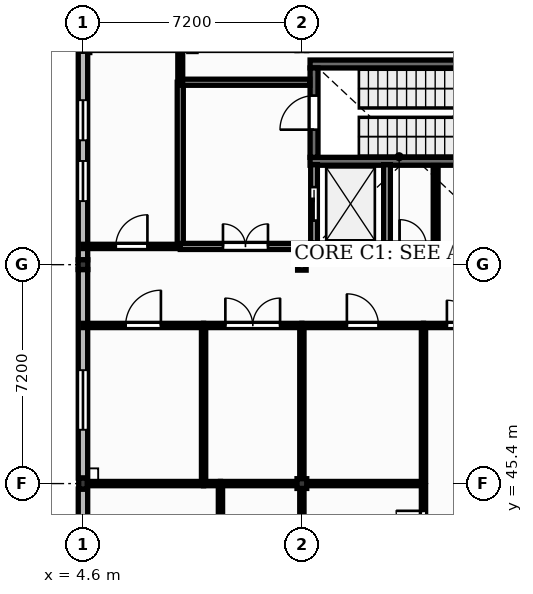
"""IFC4 building model, lengths in metres.
Left out: names, types, materials, properties, quantities, classifications, styles, units other than length and angle.
Written with IfcOpenShell. Run it as: python <this file> out.ifc"""

import sys

from ifc_helpers import new_model, si_unit, direction, frame, frame_2d, origin, origin_2d, place, context, subcontext, project, spatial, rectangle, extrude, element, fill, save


model = new_model("IFC4")
c1 = context("Model", 3, precision=1e-05, world=origin(), true_north=direction((0.0, 1.0)))
c2 = subcontext(c1, "Body", "Model", "MODEL_VIEW")
j1 = project(units=[si_unit("LENGTHUNIT", "METRE"), si_unit("PLANEANGLEUNIT", "RADIAN")], contexts=[c1])
p1 = place(None, origin())
s1 = spatial("IfcSite", under=j1, at=p1, CompositionType="ELEMENT")
p2 = place(p1, origin())
s2 = spatial("IfcBuilding", under=s1, at=p2, CompositionType="ELEMENT")
p3 = place(p2, frame((0.0, 0.0, 9.0)))
s3 = spatial("IfcBuildingStorey", under=s2, at=p3, CompositionType="ELEMENT", Elevation=9.0)
p4 = place(p3, frame((4.6, 45.4, 0.0), z_axis=(0.0, 0.0, 1.0), x_axis=(1.0, 0.0, 0.0)))
e1 = element("IfcColumn", 1, at=p4, inside=s3, PredefinedType="COLUMN", context=c2, shape_type="SweptSolid", body=[
    extrude(rectangle(XDim=0.28, YDim=0.36, at=origin_2d()), origin(), (0.0, 0.0, 1.0), 3.99),
])
for number, where, z_axis, x_axis in (
    (2, (4.6, 52.6, 0.0), (0.0, 0.0, 1.0), (1.0, 0.0, 0.0)),
    (3, (11.8, 45.4, 0.0), (0.0, 0.0, 1.0), (1.0, 0.0, 0.0)),
):
    element("IfcColumn", number, at=place(p3, frame(where, z_axis=z_axis, x_axis=x_axis)), inside=s3, PredefinedType="COLUMN", context=c2, shape_type="SweptSolid", body=[
        extrude(rectangle(XDim=0.32, YDim=0.32, at=origin_2d()), origin(), (0.0, 0.0, 1.0), 3.99),
    ])
p5 = place(p3, frame((11.8, 52.6, 0.0), z_axis=(0.0, 0.0, 1.0), x_axis=(1.0, 0.0, 0.0)))
e4 = element("IfcColumn", 4, at=p5, inside=s3, PredefinedType="COLUMN", context=c2, shape_type="SweptSolid", body=[
    extrude(rectangle(XDim=0.28, YDim=0.36, at=origin_2d()), origin(), (0.0, 0.0, 1.0), 3.99),
])
p6 = place(p3, frame((4.6, 36.96, 0.0), z_axis=(0.0, 0.0, 1.0), x_axis=(0.0, 1.0, 0.0)))
e5 = element("IfcWall", 5, at=p6, inside=s3, PredefinedType="SOLIDWALL", context=c2, shape_type="SweptSolid", body=[
    extrude(rectangle(XDim=8.26, YDim=0.31, at=frame_2d((4.13, 0.0))), origin(), (0.0, 0.0, 1.0), 3.53),
])
p7 = place(p6, frame((2.795, 0.0, 1.05)))
e6 = element("IfcOpeningElement", 6, at=p7, cuts=e5, PredefinedType="OPENING", context=c2, shape_type="SweptSolid", body=[
    extrude(rectangle(XDim=1.68, YDim=1.65, at=frame_2d((0.84, 0.825))), frame((0.0, 0.165, 0.0), z_axis=(0.0, -1.0, 0.0), x_axis=(1.0, 0.0, 0.0)), (0.0, 0.0, 1.0), 0.33),
])
p8 = place(p6, frame((5.155, 0.0, 1.05)))
e7 = element("IfcOpeningElement", 7, at=p8, cuts=e5, PredefinedType="OPENING", context=c2, shape_type="SweptSolid", body=[
    extrude(rectangle(XDim=1.68, YDim=1.65, at=frame_2d((0.84, 0.825))), frame((0.0, 0.165, 0.0), z_axis=(0.0, -1.0, 0.0), x_axis=(1.0, 0.0, 0.0)), (0.0, 0.0, 1.0), 0.33),
])
p9 = place(p3, frame((4.6, 45.58, 0.0), z_axis=(0.0, 0.0, 1.0), x_axis=(0.0, 1.0, 0.0)))
e8 = element("IfcWall", 8, at=p9, inside=s3, PredefinedType="SOLIDWALL", context=c2, shape_type="SweptSolid", body=[
    extrude(rectangle(XDim=6.86, YDim=0.31, at=frame_2d((3.43, 0.0))), origin(), (0.0, 0.0, 1.0), 3.53),
])
p10 = place(p9, frame((1.59, 0.0, 1.05)))
e9 = element("IfcOpeningElement", 9, at=p10, cuts=e8, PredefinedType="OPENING", context=c2, shape_type="SweptSolid", body=[
    extrude(rectangle(XDim=1.96, YDim=1.65, at=frame_2d((0.98, 0.825))), frame((0.0, 0.165, 0.0), z_axis=(0.0, -1.0, 0.0), x_axis=(1.0, 0.0, 0.0)), (0.0, 0.0, 1.0), 0.33),
])
p11 = place(p3, frame((4.6, 52.76, 0.0), z_axis=(0.0, 0.0, 1.0), x_axis=(0.0, 1.0, 0.0)))
e10 = element("IfcWall", 10, at=p11, inside=s3, PredefinedType="SOLIDWALL", context=c2, shape_type="SweptSolid", body=[
    extrude(rectangle(XDim=6.86, YDim=0.31, at=frame_2d((3.43, 0.0))), origin(), (0.0, 0.0, 1.0), 3.53),
])
p12 = place(p11, frame((1.93, 0.0, 1.5)))
e11 = element("IfcOpeningElement", 11, at=p12, cuts=e10, PredefinedType="OPENING", context=c2, shape_type="SweptSolid", body=[
    extrude(rectangle(XDim=1.32, YDim=1.25, at=frame_2d((0.66, 0.625))), frame((0.0, 0.165, 0.0), z_axis=(0.0, -1.0, 0.0), x_axis=(1.0, 0.0, 0.0)), (0.0, 0.0, 1.0), 0.33),
])
p13 = place(p11, frame((3.93, 0.0, 1.5)))
e12 = element("IfcOpeningElement", 12, at=p13, cuts=e10, PredefinedType="OPENING", context=c2, shape_type="SweptSolid", body=[
    extrude(rectangle(XDim=1.32, YDim=1.25, at=frame_2d((0.66, 0.625))), frame((0.0, 0.165, 0.0), z_axis=(0.0, -1.0, 0.0), x_axis=(1.0, 0.0, 0.0)), (0.0, 0.0, 1.0), 0.33),
])
for number, where, z_axis, x_axis in (
    (13, (12.07, 56.0, 0.0), (0.0, 0.0, 1.0), (1.0, 0.0, 0.0)),
    (14, (12.07, 59.2, 0.0), (0.0, 0.0, 1.0), (1.0, 0.0, 0.0)),
):
    element("IfcWall", number, at=place(p3, frame(where, z_axis=z_axis, x_axis=x_axis)), inside=s3, PredefinedType="SHEAR", context=c2, shape_type="SweptSolid", body=[
        extrude(rectangle(XDim=6.66, YDim=0.26, at=frame_2d((3.33, 0.0))), origin(), (0.0, 0.0, 1.0), 3.95),
    ])
p14 = place(p3, frame((12.2, 56.13, 0.0), z_axis=(0.0, 0.0, 1.0), x_axis=(0.0, 1.0, 0.0)))
e15 = element("IfcWall", 15, at=p14, inside=s3, PredefinedType="SHEAR", context=c2, shape_type="SweptSolid", body=[
    extrude(rectangle(XDim=2.94, YDim=0.26, at=frame_2d((1.47, 0.0))), origin(), (0.0, 0.0, 1.0), 3.95),
])
p15 = place(p14, frame((0.91, 0.0, 0.0)))
e16 = element("IfcOpeningElement", 16, at=p15, cuts=e15, PredefinedType="OPENING", context=c2, shape_type="SweptSolid", body=[
    extrude(rectangle(XDim=1.12, YDim=2.1, at=frame_2d((0.56, 1.05))), frame((0.0, 0.14, 0.0), z_axis=(0.0, -1.0, 0.0), x_axis=(1.0, 0.0, 0.0)), (0.0, 0.0, 1.0), 0.28),
])
p16 = place(p3, frame((12.2, 53.2, 0.0), z_axis=(0.0, 0.0, 1.0), x_axis=(1.0, 0.0, 0.0)))
e17 = element("IfcWall", 17, at=p16, inside=s3, PredefinedType="SOLIDWALL", context=c2, shape_type="SweptSolid", body=[
    extrude(rectangle(XDim=2.4, YDim=0.22, at=frame_2d((1.2, 0.0))), origin(), (0.0, 0.0, 1.0), 3.95),
])
p17 = place(p3, frame((12.2, 53.31, 0.0), z_axis=(0.0, 0.0, 1.0), x_axis=(0.0, 1.0, 0.0)))
e18 = element("IfcWall", 18, at=p17, inside=s3, PredefinedType="SOLIDWALL", context=c2, shape_type="SweptSolid", body=[
    extrude(rectangle(XDim=2.58, YDim=0.22, at=frame_2d((1.29, 0.0))), origin(), (0.0, 0.0, 1.0), 3.95),
])
p18 = place(p17, frame((0.74, 0.0, 0.0)))
e19 = element("IfcOpeningElement", 19, at=p18, cuts=e18, PredefinedType="OPENING", context=c2, shape_type="SweptSolid", body=[
    extrude(rectangle(XDim=1.1, YDim=2.15, at=frame_2d((0.55, 1.075))), frame((0.0, 0.12, 0.0), z_axis=(0.0, -1.0, 0.0), x_axis=(1.0, 0.0, 0.0)), (0.0, 0.0, 1.0), 0.24),
])
p19 = place(p3, frame((14.6, 53.31, 0.0), z_axis=(0.0, 0.0, 1.0), x_axis=(0.0, 1.0, 0.0)))
e20 = element("IfcWall", 20, at=p19, inside=s3, PredefinedType="SOLIDWALL", context=c2, shape_type="SweptSolid", body=[
    extrude(rectangle(XDim=2.58, YDim=0.22, at=frame_2d((1.29, 0.0))), origin(), (0.0, 0.0, 1.0), 3.95),
])
p20 = place(p3, frame((4.74, 45.4, 0.0), z_axis=(0.0, 0.0, 1.0), x_axis=(1.0, 0.0, 0.0)))
e21 = element("IfcWall", 21, at=p20, inside=s3, PredefinedType="PARTITIONING", context=c2, shape_type="SweptSolid", body=[
    extrude(rectangle(XDim=3.827, YDim=0.14, at=frame_2d((1.914, 0.0))), origin(), (0.0, 0.0, 1.0), 3.39),
])
p21 = place(p3, frame((4.6, 50.6, 0.0), z_axis=(0.0, 0.0, 1.0), x_axis=(1.0, 0.0, 0.0)))
e22 = element("IfcWall", 22, at=p21, inside=s3, PredefinedType="PARTITIONING", context=c2, shape_type="SweptSolid", body=[
    extrude(rectangle(XDim=3.967, YDim=0.14, at=frame_2d((1.983, 0.0))), origin(), (0.0, 0.0, 1.0), 3.96),
])
p22 = place(p21, frame((1.404, 0.0, 0.0)))
e23 = element("IfcOpeningElement", 23, at=p22, cuts=e22, PredefinedType="OPENING", context=c2, shape_type="SweptSolid", body=[
    extrude(rectangle(XDim=1.16, YDim=2.1, at=frame_2d((0.58, 1.05))), frame((0.0, 0.08, 0.0), z_axis=(0.0, -1.0, 0.0), x_axis=(1.0, 0.0, 0.0)), (0.0, 0.0, 1.0), 0.16),
])
p23 = place(p3, frame((4.6, 53.2, 0.0), z_axis=(0.0, 0.0, 1.0), x_axis=(1.0, 0.0, 0.0)))
e24 = element("IfcWall", 24, at=p23, inside=s3, PredefinedType="PARTITIONING", context=c2, shape_type="SweptSolid", body=[
    extrude(rectangle(XDim=3.2, YDim=0.14, at=frame_2d((1.6, 0.0))), origin(), (0.0, 0.0, 1.0), 3.96),
])
p24 = place(p23, frame((1.08, 0.0, 0.0)))
e25 = element("IfcOpeningElement", 25, at=p24, cuts=e24, PredefinedType="OPENING", context=c2, shape_type="SweptSolid", body=[
    extrude(rectangle(XDim=1.04, YDim=2.1, at=frame_2d((0.52, 1.05))), frame((0.0, 0.08, 0.0), z_axis=(0.0, -1.0, 0.0), x_axis=(1.0, 0.0, 0.0)), (0.0, 0.0, 1.0), 0.16),
])
p25 = place(p3, frame((7.8, 53.27, 0.0), z_axis=(0.0, 0.0, 1.0), x_axis=(0.0, 1.0, 0.0)))
e26 = element("IfcWall", 26, at=p25, inside=s3, PredefinedType="PARTITIONING", context=c2, shape_type="SweptSolid", body=[
    extrude(rectangle(XDim=5.33, YDim=0.2, at=frame_2d((2.665, 0.0))), origin(), (0.0, 0.0, 1.0), 3.96),
])
p26 = place(p3, frame((7.8, 53.2, 0.0), z_axis=(0.0, 0.0, 1.0), x_axis=(1.0, 0.0, 0.0)))
e27 = element("IfcWall", 27, at=p26, inside=s3, PredefinedType="PARTITIONING", context=c2, shape_type="SweptSolid", body=[
    extrude(rectangle(XDim=4.29, YDim=0.2, at=frame_2d((2.145, 0.0))), origin(), (0.0, 0.0, 1.0), 3.96),
])
p27 = place(p26, frame((1.405, 0.0, 0.0)))
e28 = element("IfcOpeningElement", 28, at=p27, cuts=e27, PredefinedType="OPENING", context=c2, shape_type="SweptSolid", body=[
    extrude(rectangle(XDim=1.48, YDim=2.25, at=frame_2d((0.74, 1.125))), frame((0.0, 0.11, 0.0), z_axis=(0.0, -1.0, 0.0), x_axis=(1.0, 0.0, 0.0)), (0.0, 0.0, 1.0), 0.22),
])
p28 = place(p3, frame((8.567, 45.47, 0.0), z_axis=(0.0, 0.0, 1.0), x_axis=(0.0, 1.0, 0.0)))
e29 = element("IfcWall", 29, at=p28, inside=s3, PredefinedType="PARTITIONING", context=c2, shape_type="SweptSolid", body=[
    extrude(rectangle(XDim=5.06, YDim=0.14, at=frame_2d((2.53, 0.0))), origin(), (0.0, 0.0, 1.0), 3.96),
])
p29 = place(p3, frame((8.567, 45.4, 0.0), z_axis=(0.0, 0.0, 1.0), x_axis=(1.0, 0.0, 0.0)))
e30 = element("IfcWall", 30, at=p29, inside=s3, PredefinedType="PARTITIONING", context=c2, shape_type="SweptSolid", body=[
    extrude(rectangle(XDim=0.555, YDim=0.14, at=frame_2d((0.278, 0.0))), origin(), (0.0, 0.0, 1.0), 3.39),
])
p30 = place(p3, frame((8.567, 50.6, 0.0), z_axis=(0.0, 0.0, 1.0), x_axis=(1.0, 0.0, 0.0)))
e31 = element("IfcWall", 31, at=p30, inside=s3, PredefinedType="PARTITIONING", context=c2, shape_type="SweptSolid", body=[
    extrude(rectangle(XDim=3.233, YDim=0.14, at=frame_2d((1.617, 0.0))), origin(), (0.0, 0.0, 1.0), 3.96),
])
p31 = place(p30, frame((0.717, 0.0, 0.0)))
e32 = element("IfcOpeningElement", 32, at=p31, cuts=e31, PredefinedType="OPENING", context=c2, shape_type="SweptSolid", body=[
    extrude(rectangle(XDim=1.8, YDim=2.3, at=frame_2d((0.9, 1.15))), frame((0.0, 0.08, 0.0), z_axis=(0.0, -1.0, 0.0), x_axis=(1.0, 0.0, 0.0)), (0.0, 0.0, 1.0), 0.16),
])
p32 = place(p3, frame((9.122, 38.52, 0.0), z_axis=(0.0, 0.0, 1.0), x_axis=(0.0, 1.0, 0.0)))
e33 = element("IfcWall", 33, at=p32, inside=s3, PredefinedType="PARTITIONING", context=c2, shape_type="SweptSolid", body=[
    extrude(rectangle(XDim=6.81, YDim=0.14, at=frame_2d((3.405, 0.0))), origin(), (0.0, 0.0, 1.0), 3.96),
])
p33 = place(p3, frame((9.122, 45.4, 0.0), z_axis=(0.0, 0.0, 1.0), x_axis=(1.0, 0.0, 0.0)))
e34 = element("IfcWall", 34, at=p33, inside=s3, PredefinedType="PARTITIONING", context=c2, shape_type="SweptSolid", body=[
    extrude(rectangle(XDim=2.518, YDim=0.14, at=frame_2d((1.259, 0.0))), origin(), (0.0, 0.0, 1.0), 3.39),
])
p34 = place(p3, frame((11.8, 41.877, 0.0), z_axis=(0.0, 0.0, 1.0), x_axis=(0.0, 1.0, 0.0)))
e35 = element("IfcWall", 35, at=p34, inside=s3, PredefinedType="PARTITIONING", context=c2, shape_type="SweptSolid", body=[
    extrude(rectangle(XDim=3.363, YDim=0.14, at=frame_2d((1.682, 0.0))), origin(), (0.0, 0.0, 1.0), 3.35),
])
p35 = place(p3, frame((11.8, 45.56, 0.0), z_axis=(0.0, 0.0, 1.0), x_axis=(0.0, 1.0, 0.0)))
e36 = element("IfcWall", 36, at=p35, inside=s3, PredefinedType="PARTITIONING", context=c2, shape_type="SweptSolid", body=[
    extrude(rectangle(XDim=4.97, YDim=0.14, at=frame_2d((2.485, 0.0))), origin(), (0.0, 0.0, 1.0), 3.47),
])
p36 = place(p3, frame((11.96, 45.4, 0.0), z_axis=(0.0, 0.0, 1.0), x_axis=(1.0, 0.0, 0.0)))
e37 = element("IfcWall", 37, at=p36, inside=s3, PredefinedType="PARTITIONING", context=c2, shape_type="SweptSolid", body=[
    extrude(rectangle(XDim=3.84, YDim=0.14, at=frame_2d((1.92, 0.0))), origin(), (0.0, 0.0, 1.0), 3.31),
])
p37 = place(p3, frame((11.8, 50.6, 0.0), z_axis=(0.0, 0.0, 1.0), x_axis=(1.0, 0.0, 0.0)))
e38 = element("IfcWall", 38, at=p37, inside=s3, PredefinedType="PARTITIONING", context=c2, shape_type="SweptSolid", body=[
    extrude(rectangle(XDim=4.0, YDim=0.14, at=frame_2d((2.0, 0.0))), origin(), (0.0, 0.0, 1.0), 3.96),
])
p38 = place(p37, frame((1.48, 0.0, 0.0)))
e39 = element("IfcOpeningElement", 39, at=p38, cuts=e38, PredefinedType="OPENING", context=c2, shape_type="SweptSolid", body=[
    extrude(rectangle(XDim=1.04, YDim=2.1, at=frame_2d((0.52, 1.05))), frame((0.0, 0.08, 0.0), z_axis=(0.0, -1.0, 0.0), x_axis=(1.0, 0.0, 0.0)), (0.0, 0.0, 1.0), 0.16),
])
p39 = place(p3, frame((14.71, 53.2, 0.0), z_axis=(0.0, 0.0, 1.0), x_axis=(1.0, 0.0, 0.0)))
e40 = element("IfcWall", 40, at=p39, inside=s3, PredefinedType="SOLIDWALL", context=c2, shape_type="SweptSolid", body=[
    extrude(rectangle(XDim=1.49, YDim=0.22, at=frame_2d((0.745, 0.0))), origin(), (0.0, 0.0, 1.0), 3.96),
])
p40 = place(p39, frame((0.305, 0.0, 0.0)))
e41 = element("IfcOpeningElement", 41, at=p40, cuts=e40, PredefinedType="OPENING", context=c2, shape_type="SweptSolid", body=[
    extrude(rectangle(XDim=0.88, YDim=2.05, at=frame_2d((0.44, 1.025))), frame((0.0, 0.12, 0.0), z_axis=(0.0, -1.0, 0.0), x_axis=(1.0, 0.0, 0.0)), (0.0, 0.0, 1.0), 0.24),
])
p41 = place(p3, frame((15.8, 41.877, 0.0), z_axis=(0.0, 0.0, 1.0), x_axis=(0.0, 1.0, 0.0)))
e42 = element("IfcWall", 42, at=p41, inside=s3, PredefinedType="PARTITIONING", context=c2, shape_type="SweptSolid", body=[
    extrude(rectangle(XDim=3.453, YDim=0.14, at=frame_2d((1.727, 0.0))), origin(), (0.0, 0.0, 1.0), 3.96),
])
p42 = place(p41, frame((0.826, 0.0, 0.0)))
e43 = element("IfcOpeningElement", 43, at=p42, cuts=e42, PredefinedType="OPENING", context=c2, shape_type="SweptSolid", body=[
    extrude(rectangle(XDim=1.8, YDim=2.3, at=frame_2d((0.9, 1.15))), frame((0.0, 0.08, 0.0), z_axis=(0.0, -1.0, 0.0), x_axis=(1.0, 0.0, 0.0)), (0.0, 0.0, 1.0), 0.16),
])
p43 = place(p3, frame((15.8, 45.47, 0.0), z_axis=(0.0, 0.0, 1.0), x_axis=(0.0, 1.0, 0.0)))
e44 = element("IfcWall", 44, at=p43, inside=s3, PredefinedType="PARTITIONING", context=c2, shape_type="SweptSolid", body=[
    extrude(rectangle(XDim=5.06, YDim=0.14, at=frame_2d((2.53, 0.0))), origin(), (0.0, 0.0, 1.0), 3.96),
])
p44 = place(p3, frame((15.8, 50.6, 0.0), z_axis=(0.0, 0.0, 1.0), x_axis=(1.0, 0.0, 0.0)))
e45 = element("IfcWall", 45, at=p44, inside=s3, PredefinedType="PARTITIONING", context=c2, shape_type="SweptSolid", body=[
    extrude(rectangle(XDim=3.2, YDim=0.14, at=frame_2d((1.6, 0.0))), origin(), (0.0, 0.0, 1.0), 3.96),
])
p45 = place(p44, frame((0.77, 0.0, 0.0)))
e46 = element("IfcOpeningElement", 46, at=p45, cuts=e45, PredefinedType="OPENING", context=c2, shape_type="SweptSolid", body=[
    extrude(rectangle(XDim=1.66, YDim=2.3, at=frame_2d((0.83, 1.15))), frame((0.0, 0.08, 0.0), z_axis=(0.0, -1.0, 0.0), x_axis=(1.0, 0.0, 0.0)), (0.0, 0.0, 1.0), 0.16),
])
p46 = place(p3, frame((16.2, 53.27, 0.0), z_axis=(0.0, 0.0, 1.0), x_axis=(0.0, 1.0, 0.0)))
e47 = element("IfcWall", 47, at=p46, inside=s3, PredefinedType="PARTITIONING", context=c2, shape_type="SweptSolid", body=[
    extrude(rectangle(XDim=2.59, YDim=0.16, at=frame_2d((1.295, 0.0))), origin(), (0.0, 0.0, 1.0), 3.96),
])
p47 = place(p3, frame((12.06, 58.6, 0.0), z_axis=(0.0, 0.0, 1.0), x_axis=(-1.0, 0.0, 0.0)))
e48 = element("IfcWall", 48, at=p47, inside=s3, PredefinedType="PARTITIONING", context=c2, shape_type="SweptSolid", body=[
    extrude(rectangle(XDim=4.26, YDim=0.2, at=frame_2d((2.13, 0.0))), origin(), (0.0, 0.0, 1.0), 3.96),
])
p48 = place(p3, frame((19.0, 53.2, 0.0), z_axis=(0.0, 0.0, 1.0), x_axis=(-1.0, 0.0, 0.0)))
e49 = element("IfcWall", 49, at=p48, inside=s3, PredefinedType="PARTITIONING", context=c2, shape_type="SweptSolid", body=[
    extrude(rectangle(XDim=2.8, YDim=0.16, at=frame_2d((1.4, 0.0))), origin(), (0.0, 0.0, 1.0), 3.96),
])
p49 = place(p3, frame((7.8, 58.6, 0.0), z_axis=(0.0, 0.0, 1.0), x_axis=(0.0, 1.0, 0.0)))
e50 = element("IfcWall", 50, at=p49, inside=s3, PredefinedType="PARTITIONING", context=c2, shape_type="SweptSolid", body=[
    extrude(rectangle(XDim=1.2, YDim=0.16, at=frame_2d((0.6, 0.0))), origin(), (0.0, 0.0, 1.0), 3.96),
])
p50 = place(p10, origin())
e51 = element("IfcWindow", 51, at=p50, inside=s3, PartitioningType="DOUBLE_PANEL_VERTICAL", PredefinedType="WINDOW", context=c2, shape_type="SweptSolid", body=[
    extrude(rectangle(XDim=1.96, YDim=1.65, at=frame_2d((0.98, 0.825))), frame((0.0, 0.03, 0.0), z_axis=(0.0, -1.0, 0.0), x_axis=(1.0, 0.0, 0.0)), (0.0, 0.0, 1.0), 0.06),
])
fill(e9, e51)
p51 = place(p12, origin())
e52 = element("IfcWindow", 52, at=p51, inside=s3, PartitioningType="SINGLE_PANEL", PredefinedType="WINDOW", context=c2, shape_type="SweptSolid", body=[
    extrude(rectangle(XDim=1.32, YDim=1.25, at=frame_2d((0.66, 0.625))), frame((0.0, 0.03, 0.0), z_axis=(0.0, -1.0, 0.0), x_axis=(1.0, 0.0, 0.0)), (0.0, 0.0, 1.0), 0.06),
])
fill(e11, e52)
p52 = place(p13, origin())
e53 = element("IfcWindow", 53, at=p52, inside=s3, PartitioningType="SINGLE_PANEL", PredefinedType="WINDOW", context=c2, shape_type="SweptSolid", body=[
    extrude(rectangle(XDim=1.32, YDim=1.25, at=frame_2d((0.66, 0.625))), frame((0.0, 0.03, 0.0), z_axis=(0.0, -1.0, 0.0), x_axis=(1.0, 0.0, 0.0)), (0.0, 0.0, 1.0), 0.06),
])
fill(e12, e53)
p53 = place(p18, origin())
e54 = element("IfcDoor", 54, at=p53, inside=s3, OperationType="SLIDING_TO_LEFT", PredefinedType="DOOR", context=c2, shape_type="SweptSolid", body=[
    extrude(rectangle(XDim=1.1, YDim=2.15, at=frame_2d((0.55, 1.075))), frame((0.0, 0.025, 0.0), z_axis=(0.0, -1.0, 0.0), x_axis=(1.0, 0.0, 0.0)), (0.0, 0.0, 1.0), 0.05),
])
fill(e19, e54)
p54 = place(p15, origin())
e55 = element("IfcDoor", 55, at=p54, inside=s3, OperationType="SINGLE_SWING_LEFT", PredefinedType="DOOR", context=c2, shape_type="SweptSolid", body=[
    extrude(rectangle(XDim=1.12, YDim=2.1, at=frame_2d((0.56, 1.05))), frame((0.0, 0.025, 0.0), z_axis=(0.0, -1.0, 0.0), x_axis=(1.0, 0.0, 0.0)), (0.0, 0.0, 1.0), 0.05),
])
fill(e16, e55)
p55 = place(p27, origin())
e56 = element("IfcDoor", 56, at=p55, inside=s3, OperationType="DOUBLE_DOOR_SINGLE_SWING", PredefinedType="DOOR", context=c2, shape_type="SweptSolid", body=[
    extrude(rectangle(XDim=1.48, YDim=2.25, at=frame_2d((0.74, 1.125))), frame((0.0, 0.025, 0.0), z_axis=(0.0, -1.0, 0.0), x_axis=(1.0, 0.0, 0.0)), (0.0, 0.0, 1.0), 0.05),
])
fill(e28, e56)
p56 = place(p45, origin())
e57 = element("IfcDoor", 57, at=p56, inside=s3, OperationType="DOUBLE_DOOR_SINGLE_SWING", PredefinedType="DOOR", context=c2, shape_type="SweptSolid", body=[
    extrude(rectangle(XDim=1.66, YDim=2.3, at=frame_2d((0.83, 1.15))), frame((0.0, 0.025, 0.0), z_axis=(0.0, -1.0, 0.0), x_axis=(1.0, 0.0, 0.0)), (0.0, 0.0, 1.0), 0.05),
])
fill(e46, e57)
p57 = place(p40, origin())
e58 = element("IfcDoor", 58, at=p57, inside=s3, OperationType="SINGLE_SWING_LEFT", PredefinedType="DOOR", context=c2, shape_type="SweptSolid", body=[
    extrude(rectangle(XDim=0.88, YDim=2.05, at=frame_2d((0.44, 1.025))), frame((0.0, 0.025, 0.0), z_axis=(0.0, -1.0, 0.0), x_axis=(1.0, 0.0, 0.0)), (0.0, 0.0, 1.0), 0.05),
])
fill(e41, e58)
p58 = place(p22, origin())
e59 = element("IfcDoor", 59, at=p58, inside=s3, OperationType="SINGLE_SWING_RIGHT", PredefinedType="DOOR", context=c2, shape_type="SweptSolid", body=[
    extrude(rectangle(XDim=1.16, YDim=2.1, at=frame_2d((0.58, 1.05))), frame((0.0, 0.025, 0.0), z_axis=(0.0, -1.0, 0.0), x_axis=(1.0, 0.0, 0.0)), (0.0, 0.0, 1.0), 0.05),
])
fill(e23, e59)
p59 = place(p31, origin())
e60 = element("IfcDoor", 60, at=p59, inside=s3, OperationType="DOUBLE_DOOR_SINGLE_SWING", PredefinedType="DOOR", context=c2, shape_type="SweptSolid", body=[
    extrude(rectangle(XDim=1.8, YDim=2.3, at=frame_2d((0.9, 1.15))), frame((0.0, 0.025, 0.0), z_axis=(0.0, -1.0, 0.0), x_axis=(1.0, 0.0, 0.0)), (0.0, 0.0, 1.0), 0.05),
])
fill(e32, e60)
p60 = place(p24, origin())
e61 = element("IfcDoor", 61, at=p60, inside=s3, OperationType="SINGLE_SWING_RIGHT", PredefinedType="DOOR", context=c2, shape_type="SweptSolid", body=[
    extrude(rectangle(XDim=1.04, YDim=2.1, at=frame_2d((0.52, 1.05))), frame((0.0, 0.025, 0.0), z_axis=(0.0, -1.0, 0.0), x_axis=(1.0, 0.0, 0.0)), (0.0, 0.0, 1.0), 0.05),
])
fill(e25, e61)
p61 = place(p42, origin())
e62 = element("IfcDoor", 62, at=p61, inside=s3, OperationType="DOUBLE_DOOR_SINGLE_SWING", PredefinedType="DOOR", context=c2, shape_type="SweptSolid", body=[
    extrude(rectangle(XDim=1.8, YDim=2.3, at=frame_2d((0.9, 1.15))), frame((0.0, 0.025, 0.0), z_axis=(0.0, -1.0, 0.0), x_axis=(1.0, 0.0, 0.0)), (0.0, 0.0, 1.0), 0.05),
])
fill(e43, e62)
p62 = place(p38, origin())
e63 = element("IfcDoor", 63, at=p62, inside=s3, OperationType="SINGLE_SWING_LEFT", PredefinedType="DOOR", context=c2, shape_type="SweptSolid", body=[
    extrude(rectangle(XDim=1.04, YDim=2.1, at=frame_2d((0.52, 1.05))), frame((0.0, 0.025, 0.0), z_axis=(0.0, -1.0, 0.0), x_axis=(1.0, 0.0, 0.0)), (0.0, 0.0, 1.0), 0.05),
])
fill(e39, e63)
save(model, sys.argv[1])
